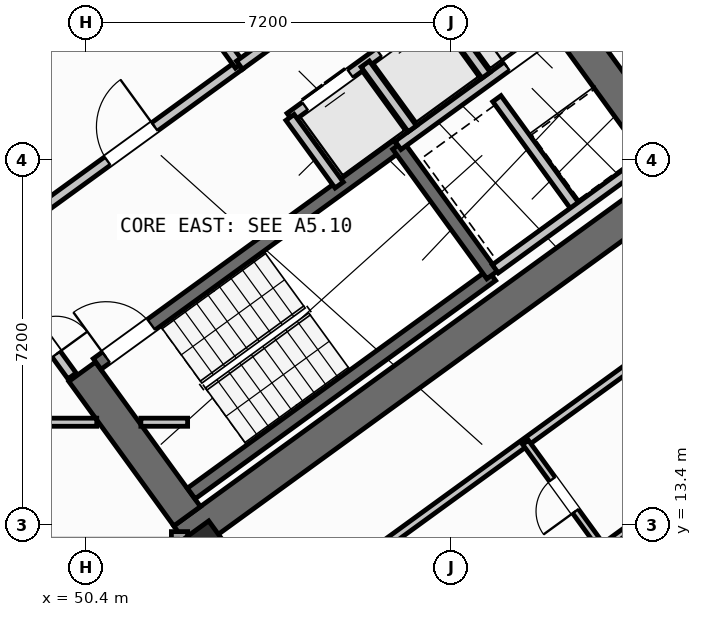
"""IFC4 building model, lengths in metres.
Left out: names, types, materials, properties, quantities, classifications, styles, units other than length and angle.
Written with IfcOpenShell. Run it as: python <this file> out.ifc"""

import sys

from ifc_helpers import new_model, si_unit, direction, frame, frame_2d, origin, origin_2d, place, context, subcontext, project, spatial, rectangle, hollow_rectangle, extrude, source, transform, mapped, element, fill, save


model = new_model("IFC4")
c1 = context("Model", 3, precision=1e-05, world=origin(), true_north=direction((0.0, 1.0)))
c2 = subcontext(c1, "Body", "Model", "MODEL_VIEW")
j1 = project(units=[si_unit("LENGTHUNIT", "METRE"), si_unit("PLANEANGLEUNIT", "RADIAN")], contexts=[c1])
p1 = place(None, origin())
s1 = spatial("IfcSite", under=j1, at=p1, CompositionType="ELEMENT")
p2 = place(p1, origin())
s2 = spatial("IfcBuilding", under=s1, at=p2, CompositionType="ELEMENT")
p3 = place(p2, frame((0.0, 0.0, 49.2)))
s3 = spatial("IfcBuildingStorey", under=s2, at=p3, CompositionType="ELEMENT", Elevation=49.2)
p4 = place(p3, frame((52.318, 13.11, 0.0), z_axis=(0.0, 0.0, 1.0), x_axis=(0.809019445368, 0.587781878776, 0.0)))
e1 = element("IfcWall", 1, at=p4, inside=s3, PredefinedType="SHEAR", context=c2, shape_type="SweptSolid", body=[
    extrude(rectangle(XDim=12.44, YDim=0.65, at=frame_2d((6.22, 0.0))), origin(), (0.0, 0.0, 1.0), 3.35),
])
p5 = place(p3, frame((52.39, 13.564, 0.0), z_axis=(0.0, 0.0, 1.0), x_axis=(-0.58779688989, 0.809008539037, 0.0)))
e2 = element("IfcWall", 2, at=p5, inside=s3, PredefinedType="SHEAR", context=c2, shape_type="SweptSolid", body=[
    extrude(rectangle(XDim=3.525, YDim=0.65, at=frame_2d((1.763, 0.0))), origin(), (0.0, 0.0, 1.0), 3.35),
])
p6 = place(p3, frame((61.929, 20.494, 0.0), z_axis=(0.0, 0.0, 1.0), x_axis=(-0.58782982593, 0.808984607855, 0.0)))
e3 = element("IfcWall", 3, at=p6, inside=s3, PredefinedType="SHEAR", context=c2, shape_type="SweptSolid", body=[
    extrude(rectangle(XDim=3.525, YDim=0.65, at=frame_2d((1.762, 0.0))), origin(), (0.0, 0.0, 1.0), 3.35),
])
m1 = source(origin(), c2, "Body", "SweptSolid", [
    extrude(hollow_rectangle(XDim=1.0, YDim=1.0, WallThickness=0.04, at=origin_2d()), origin(), (0.0, 0.0, 1.0), 3.6),
])
p7 = place(p3, frame((52.705, 12.773, 0.0), z_axis=(0.0, 0.0, 1.0), x_axis=(0.809016994375, 0.587785252292, 0.0)))
e4 = element("IfcColumn", 4, at=p7, inside=s3, PredefinedType="COLUMN", context=c2, shape_type="MappedRepresentation", body=[
    mapped(m1, transform((0.0, 0.0, 0.0), scale=1.0)),
])
p8 = place(p3, frame((58.455, 35.484, 0.0), z_axis=(0.0, 0.0, 1.0), x_axis=(0.587783625747, -0.809018176127, 0.0)))
e5 = element("IfcWall", 5, at=p8, inside=s3, PredefinedType="STANDARD", context=c2, shape_type="SweptSolid", body=[
    extrude(rectangle(XDim=21.587, YDim=0.32, at=frame_2d((10.794, 0.0))), origin(), (0.0, 0.0, 1.0), 2.725),
])
p9 = place(p8, frame((1.5, 0.0, 0.8)))
e6 = element("IfcOpeningElement", 6, at=p9, cuts=e5, PredefinedType="OPENING", context=c2, shape_type="SweptSolid", body=[
    extrude(rectangle(XDim=2.1, YDim=1.55, at=frame_2d((1.05, 0.775))), frame((0.0, 0.17, 0.0), z_axis=(0.0, -1.0, 0.0), x_axis=(1.0, 0.0, 0.0)), (0.0, 0.0, 1.0), 0.34),
])
p10 = place(p8, frame((5.105, 0.0, 0.85)))
e7 = element("IfcOpeningElement", 7, at=p10, cuts=e5, PredefinedType="OPENING", context=c2, shape_type="SweptSolid", body=[
    extrude(rectangle(XDim=1.5, YDim=1.5, at=frame_2d((0.75, 0.75))), frame((0.0, 0.17, 0.0), z_axis=(0.0, -1.0, 0.0), x_axis=(1.0, 0.0, 0.0)), (0.0, 0.0, 1.0), 0.34),
])
p11 = place(p8, frame((8.954, 0.0, 0.85)))
e8 = element("IfcOpeningElement", 8, at=p11, cuts=e5, PredefinedType="OPENING", context=c2, shape_type="SweptSolid", body=[
    extrude(rectangle(XDim=1.5, YDim=1.5, at=frame_2d((0.75, 0.75))), frame((0.0, 0.17, 0.0), z_axis=(0.0, -1.0, 0.0), x_axis=(1.0, 0.0, 0.0)), (0.0, 0.0, 1.0), 0.34),
])
p12 = place(p8, frame((17.581, 0.0, 0.95)))
e9 = element("IfcOpeningElement", 9, at=p12, cuts=e5, PredefinedType="OPENING", context=c2, shape_type="SweptSolid", body=[
    extrude(rectangle(XDim=1.2, YDim=1.4, at=frame_2d((0.6, 0.7))), frame((0.0, 0.17, 0.0), z_axis=(0.0, -1.0, 0.0), x_axis=(1.0, 0.0, 0.0)), (0.0, 0.0, 1.0), 0.34),
])
p13 = place(p3, frame((71.098, 17.731, 0.0), z_axis=(0.0, 0.0, 1.0), x_axis=(-0.809021120468, -0.587779573171, 0.0)))
e10 = element("IfcWall", 10, at=p13, inside=s3, PredefinedType="STANDARD", context=c2, shape_type="SweptSolid", body=[
    extrude(rectangle(XDim=17.588, YDim=0.32, at=frame_2d((8.794, 0.0))), origin(), (0.0, 0.0, 1.0), 3.35),
])
p14 = place(p13, frame((1.624, 0.0, 0.0)))
e11 = element("IfcOpeningElement", 11, at=p14, cuts=e10, PredefinedType="OPENING", context=c2, shape_type="SweptSolid", body=[
    extrude(rectangle(XDim=1.05, YDim=2.15, at=frame_2d((0.525, 1.075))), frame((0.0, 0.17, 0.0), z_axis=(0.0, -1.0, 0.0), x_axis=(1.0, 0.0, 0.0)), (0.0, 0.0, 1.0), 0.34),
])
p15 = place(p13, frame((4.104, 0.0, 1.0)))
e12 = element("IfcOpeningElement", 12, at=p15, cuts=e10, PredefinedType="OPENING", context=c2, shape_type="SweptSolid", body=[
    extrude(rectangle(XDim=0.9, YDim=1.25, at=frame_2d((0.45, 0.625))), frame((0.0, 0.17, 0.0), z_axis=(0.0, -1.0, 0.0), x_axis=(1.0, 0.0, 0.0)), (0.0, 0.0, 1.0), 0.34),
])
p16 = place(p13, frame((7.879, 0.0, 0.85)))
e13 = element("IfcOpeningElement", 13, at=p16, cuts=e10, PredefinedType="OPENING", context=c2, shape_type="SweptSolid", body=[
    extrude(rectangle(XDim=1.8, YDim=1.5, at=frame_2d((0.9, 0.75))), frame((0.0, 0.17, 0.0), z_axis=(0.0, -1.0, 0.0), x_axis=(1.0, 0.0, 0.0)), (0.0, 0.0, 1.0), 0.34),
])
p17 = place(p13, frame((12.849, 0.0, 0.85)))
e14 = element("IfcOpeningElement", 14, at=p17, cuts=e10, PredefinedType="OPENING", context=c2, shape_type="SweptSolid", body=[
    extrude(rectangle(XDim=1.8, YDim=1.5, at=frame_2d((0.9, 0.75))), frame((0.0, 0.17, 0.0), z_axis=(0.0, -1.0, 0.0), x_axis=(1.0, 0.0, 0.0)), (0.0, 0.0, 1.0), 0.34),
])
p18 = place(p3, frame((52.24, 13.261, 0.0), z_axis=(0.0, 0.0, 1.0), x_axis=(0.0, -1.0, 0.0)))
e15 = element("IfcWall", 15, at=p18, inside=s3, PredefinedType="STANDARD", context=c2, shape_type="SweptSolid", body=[
    extrude(rectangle(XDim=9.795, YDim=0.32, at=frame_2d((4.897, 0.0))), origin(), (0.0, 0.0, 1.0), 3.35),
])
p19 = place(p18, frame((2.349, 0.0, 0.8)))
e16 = element("IfcOpeningElement", 16, at=p19, cuts=e15, PredefinedType="OPENING", context=c2, shape_type="SweptSolid", body=[
    extrude(rectangle(XDim=2.1, YDim=1.55, at=frame_2d((1.05, 0.775))), frame((0.0, 0.17, 0.0), z_axis=(0.0, -1.0, 0.0), x_axis=(1.0, 0.0, 0.0)), (0.0, 0.0, 1.0), 0.34),
])
p20 = place(p18, frame((7.03, 0.0, 0.85)))
e17 = element("IfcOpeningElement", 17, at=p20, cuts=e15, PredefinedType="OPENING", context=c2, shape_type="SweptSolid", body=[
    extrude(rectangle(XDim=1.8, YDim=1.5, at=frame_2d((0.9, 0.75))), frame((0.0, 0.17, 0.0), z_axis=(0.0, -1.0, 0.0), x_axis=(1.0, 0.0, 0.0)), (0.0, 0.0, 1.0), 0.34),
])
p21 = place(p3, frame((52.472, 14.013, 0.0), z_axis=(0.0, 0.0, 1.0), x_axis=(0.809028366311, 0.587769599847, 0.0)))
e18 = element("IfcWall", 18, at=p21, inside=s3, PredefinedType="SHEAR", context=c2, shape_type="SweptSolid", body=[
    extrude(rectangle(XDim=7.33, YDim=0.26, at=frame_2d((3.665, 0.0))), origin(), (0.0, 0.0, 1.0), 3.35),
])
p22 = place(p3, frame((50.615, 16.57, 0.0), z_axis=(0.0, 0.0, 1.0), x_axis=(0.809028366311, 0.587769599847, 0.0)))
e19 = element("IfcWall", 19, at=p22, inside=s3, PredefinedType="SHEAR", context=c2, shape_type="SweptSolid", body=[
    extrude(rectangle(XDim=7.33, YDim=0.26, at=frame_2d((3.665, 0.0))), origin(), (0.0, 0.0, 1.0), 3.35),
])
p23 = place(p22, frame((0.22, 0.0, 0.0)))
e20 = element("IfcOpeningElement", 20, at=p23, cuts=e19, PredefinedType="OPENING", context=c2, shape_type="SweptSolid", body=[
    extrude(rectangle(XDim=1.1, YDim=2.1, at=frame_2d((0.55, 1.05))), frame((0.0, 0.14, 0.0), z_axis=(0.0, -1.0, 0.0), x_axis=(1.0, 0.0, 0.0)), (0.0, 0.0, 1.0), 0.28),
])
p24 = place(p3, frame((58.41, 18.327, 0.0), z_axis=(0.0, 0.0, 1.0), x_axis=(-0.58776738483, 0.809029975545, 0.0)))
e21 = element("IfcWall", 21, at=p24, inside=s3, PredefinedType="SHEAR", context=c2, shape_type="SweptSolid", body=[
    extrude(rectangle(XDim=3.16, YDim=0.26, at=frame_2d((1.58, 0.0))), origin(), (0.0, 0.0, 1.0), 3.35),
])
p25 = place(p3, frame((47.106, 21.437, 0.0), z_axis=(0.0, 0.0, 1.0), x_axis=(0.809012514015, 0.58779141893, 0.0)))
e22 = element("IfcWall", 22, at=p25, inside=s3, PredefinedType="STANDARD", context=c2, shape_type="SweptSolid", body=[
    extrude(rectangle(XDim=3.398, YDim=0.2, at=frame_2d((1.699, 0.0))), origin(), (0.0, 0.0, 1.0), 3.34),
])
p26 = place(p25, frame((0.408, 0.0, 0.0)))
e23 = element("IfcOpeningElement", 23, at=p26, cuts=e22, PredefinedType="OPENING", context=c2, shape_type="SweptSolid", body=[
    extrude(rectangle(XDim=1.3, YDim=2.2, at=frame_2d((0.65, 1.1))), frame((0.0, 0.11, 0.0), z_axis=(0.0, -1.0, 0.0), x_axis=(1.0, 0.0, 0.0)), (0.0, 0.0, 1.0), 0.22),
])
p27 = place(p3, frame((48.799, 19.107, 0.0), z_axis=(0.0, 0.0, 1.0), x_axis=(0.809012959416, 0.587790805897, 0.0)))
e24 = element("IfcWall", 24, at=p27, inside=s3, PredefinedType="STANDARD", context=c2, shape_type="SweptSolid", body=[
    extrude(rectangle(XDim=5.718, YDim=0.2, at=frame_2d((2.859, 0.0))), origin(), (0.0, 0.0, 1.0), 3.34),
])
p28 = place(p27, frame((2.498, 0.0, 0.0)))
e25 = element("IfcOpeningElement", 25, at=p28, cuts=e24, PredefinedType="OPENING", context=c2, shape_type="SweptSolid", body=[
    extrude(rectangle(XDim=1.15, YDim=2.1, at=frame_2d((0.575, 1.05))), frame((0.0, 0.11, 0.0), z_axis=(0.0, -1.0, 0.0), x_axis=(1.0, 0.0, 0.0)), (0.0, 0.0, 1.0), 0.22),
])
p29 = place(p3, frame((56.553, 20.884, 0.0), z_axis=(0.0, 0.0, 1.0), x_axis=(0.809035789462, 0.587759382205, 0.0)))
e26 = element("IfcWall", 26, at=p29, inside=s3, PredefinedType="STANDARD", context=c2, shape_type="SweptSolid", body=[
    extrude(rectangle(XDim=3.768, YDim=0.2, at=frame_2d((1.884, 0.0))), origin(), (0.0, 0.0, 1.0), 3.34),
])
p30 = place(p29, frame((2.65, 0.0, 0.0)))
e27 = element("IfcOpeningElement", 27, at=p30, cuts=e26, PredefinedType="OPENING", context=c2, shape_type="SweptSolid", body=[
    extrude(rectangle(XDim=0.86, YDim=2.05, at=frame_2d((0.43, 1.025))), frame((0.0, 0.11, 0.0), z_axis=(0.0, -1.0, 0.0), x_axis=(1.0, 0.0, 0.0)), (0.0, 0.0, 1.0), 0.22),
])
p31 = place(p3, frame((54.421, 21.436, 0.0), z_axis=(0.0, 0.0, 1.0), x_axis=(0.809013710463, 0.587789772183, 0.0)))
e28 = element("IfcWall", 28, at=p31, inside=s3, PredefinedType="STANDARD", context=c2, shape_type="SweptSolid", body=[
    extrude(rectangle(XDim=5.36, YDim=0.2, at=frame_2d((2.68, 0.0))), origin(), (0.0, 0.0, 1.0), 3.34),
])
p32 = place(p31, frame((0.37, 0.0, 0.0)))
e29 = element("IfcOpeningElement", 29, at=p32, cuts=e28, PredefinedType="OPENING", context=c2, shape_type="SweptSolid", body=[
    extrude(rectangle(XDim=1.1, YDim=2.15, at=frame_2d((0.55, 1.075))), frame((0.0, 0.11, 0.0), z_axis=(0.0, -1.0, 0.0), x_axis=(1.0, 0.0, 0.0)), (0.0, 0.0, 1.0), 0.22),
])
p33 = place(p31, frame((2.17, 0.0, 0.0)))
e30 = element("IfcOpeningElement", 30, at=p33, cuts=e28, PredefinedType="OPENING", context=c2, shape_type="SweptSolid", body=[
    extrude(rectangle(XDim=1.1, YDim=2.15, at=frame_2d((0.55, 1.075))), frame((0.0, 0.11, 0.0), z_axis=(0.0, -1.0, 0.0), x_axis=(1.0, 0.0, 0.0)), (0.0, 0.0, 1.0), 0.22),
])
p34 = place(p31, frame((3.97, 0.0, 0.0)))
e31 = element("IfcOpeningElement", 31, at=p34, cuts=e28, PredefinedType="OPENING", context=c2, shape_type="SweptSolid", body=[
    extrude(rectangle(XDim=1.1, YDim=2.15, at=frame_2d((0.55, 1.075))), frame((0.0, 0.11, 0.0), z_axis=(0.0, -1.0, 0.0), x_axis=(1.0, 0.0, 0.0)), (0.0, 0.0, 1.0), 0.22),
])
p35 = place(p3, frame((55.391, 20.102, 0.0), z_axis=(0.0, 0.0, 1.0), x_axis=(-0.58778447739, 0.809017557374, 0.0)))
e32 = element("IfcWall", 32, at=p35, inside=s3, PredefinedType="STANDARD", context=c2, shape_type="SweptSolid", body=[
    extrude(rectangle(XDim=1.65, YDim=0.2, at=frame_2d((0.825, 0.0))), origin(), (0.0, 0.0, 1.0), 3.34),
])
p36 = place(p3, frame((56.834, 21.212, 0.0), z_axis=(0.0, 0.0, 1.0), x_axis=(-0.58776738483, 0.809029975545, 0.0)))
e33 = element("IfcWall", 33, at=p36, inside=s3, PredefinedType="STANDARD", context=c2, shape_type="SweptSolid", body=[
    extrude(rectangle(XDim=1.58, YDim=0.2, at=frame_2d((0.79, 0.0))), origin(), (0.0, 0.0, 1.0), 3.34),
])
p37 = place(p3, frame((58.29, 22.27, 0.0), z_axis=(0.0, 0.0, 1.0), x_axis=(-0.587840865826, 0.808976585857, 0.0)))
e34 = element("IfcWall", 34, at=p37, inside=s3, PredefinedType="STANDARD", context=c2, shape_type="SweptSolid", body=[
    extrude(rectangle(XDim=1.58, YDim=0.2, at=frame_2d((0.79, 0.0))), origin(), (0.0, 0.0, 1.0), 3.34),
])
p38 = place(p3, frame((60.067, 19.655, 0.0), z_axis=(0.0, 0.0, 1.0), x_axis=(-0.587800520745, 0.809005900975, 0.0)))
e35 = element("IfcWall", 35, at=p38, inside=s3, PredefinedType="STANDARD", context=c2, shape_type="SweptSolid", body=[
    extrude(rectangle(XDim=2.66, YDim=0.2, at=frame_2d((1.33, 0.0))), origin(), (0.0, 0.0, 1.0), 3.34),
])
p39 = place(p3, frame((58.472, 18.447, 0.0), z_axis=(0.0, 0.0, 1.0), x_axis=(0.809022487728, 0.587777691266, 0.0)))
e36 = element("IfcWall", 36, at=p39, inside=s3, PredefinedType="STANDARD", context=c2, shape_type="SweptSolid", body=[
    extrude(rectangle(XDim=3.648, YDim=0.2, at=frame_2d((1.824, 0.0))), origin(), (0.0, 0.0, 1.0), 3.34),
])
p40 = place(p3, frame((53.425, 22.468, 0.0), z_axis=(0.0, 0.0, 1.0), x_axis=(-0.5877230039, 0.809062216821, 0.0)))
e37 = element("IfcWall", 37, at=p40, inside=s3, PredefinedType="STANDARD", context=c2, shape_type="SweptSolid", body=[
    extrude(rectangle(XDim=2.88, YDim=0.2, at=frame_2d((1.44, 0.0))), origin(), (0.0, 0.0, 1.0), 3.34),
])
p41 = place(p3, frame((53.425, 22.468, 0.0), z_axis=(0.0, 0.0, 1.0), x_axis=(0.80902705128, 0.587771409902, 0.0)))
e38 = element("IfcWall", 38, at=p41, inside=s3, PredefinedType="STANDARD", context=c2, shape_type="SweptSolid", body=[
    extrude(rectangle(XDim=5.368, YDim=0.2, at=frame_2d((2.684, 0.0))), origin(), (0.0, 0.0, 1.0), 3.34),
])
p42 = place(p41, frame((4.28, 0.0, 0.0)))
e39 = element("IfcOpeningElement", 39, at=p42, cuts=e38, PredefinedType="OPENING", context=c2, shape_type="SweptSolid", body=[
    extrude(rectangle(XDim=0.86, YDim=2.05, at=frame_2d((0.43, 1.025))), frame((0.0, 0.11, 0.0), z_axis=(0.0, -1.0, 0.0), x_axis=(1.0, 0.0, 0.0)), (0.0, 0.0, 1.0), 0.22),
])
p43 = place(p41, frame((1.45, 0.0, 0.0)))
e40 = element("IfcOpeningElement", 40, at=p43, cuts=e38, PredefinedType="OPENING", context=c2, shape_type="SweptSolid", body=[
    extrude(rectangle(XDim=0.86, YDim=2.05, at=frame_2d((0.43, 1.025))), frame((0.0, 0.11, 0.0), z_axis=(0.0, -1.0, 0.0), x_axis=(1.0, 0.0, 0.0)), (0.0, 0.0, 1.0), 0.22),
])
p44 = place(p3, frame((35.296, 15.42, 0.0), z_axis=(0.0, 0.0, 1.0), x_axis=(1.0, 0.0, 0.0)))
e41 = element("IfcWall", 41, at=p44, inside=s3, PredefinedType="PARTITIONING", context=c2, shape_type="SweptSolid", body=[
    extrude(rectangle(XDim=15.311, YDim=0.16, at=frame_2d((7.655, 0.0))), origin(), (0.0, 0.0, 1.0), 3.34),
])
p45 = place(p44, frame((0.615, 0.0, 0.0)))
e42 = element("IfcOpeningElement", 42, at=p45, cuts=e41, PredefinedType="OPENING", context=c2, shape_type="SweptSolid", body=[
    extrude(rectangle(XDim=1.0, YDim=2.1, at=frame_2d((0.5, 1.05))), frame((0.0, 0.09, 0.0), z_axis=(0.0, -1.0, 0.0), x_axis=(1.0, 0.0, 0.0)), (0.0, 0.0, 1.0), 0.18),
])
p46 = place(p44, frame((9.035, 0.0, 0.0)))
e43 = element("IfcOpeningElement", 43, at=p46, cuts=e41, PredefinedType="OPENING", context=c2, shape_type="SweptSolid", body=[
    extrude(rectangle(XDim=1.0, YDim=2.1, at=frame_2d((0.5, 1.05))), frame((0.0, 0.09, 0.0), z_axis=(0.0, -1.0, 0.0), x_axis=(1.0, 0.0, 0.0)), (0.0, 0.0, 1.0), 0.18),
])
p47 = place(p3, frame((51.477, 15.42, 0.0), z_axis=(0.0, 0.0, 1.0), x_axis=(1.0, 0.0, 0.0)))
e44 = element("IfcWall", 44, at=p47, inside=s3, PredefinedType="PARTITIONING", context=c2, shape_type="SweptSolid", body=[
    extrude(rectangle(XDim=0.923, YDim=0.16, at=frame_2d((0.461, 0.0))), origin(), (0.0, 0.0, 1.0), 3.34),
])
p48 = place(p3, frame((50.119, 16.333, 0.0), z_axis=(0.0, 0.0, 1.0), x_axis=(-0.587749856981, 0.809042709391, 0.0)))
e45 = element("IfcWall", 45, at=p48, inside=s3, PredefinedType="STANDARD", context=c2, shape_type="SweptSolid", body=[
    extrude(rectangle(XDim=2.96, YDim=0.2, at=frame_2d((1.48, 0.0))), origin(), (0.0, 0.0, 1.0), 3.34),
])
p49 = place(p48, frame((0.53, 0.0, 0.0)))
e46 = element("IfcOpeningElement", 46, at=p49, cuts=e45, PredefinedType="OPENING", context=c2, shape_type="SweptSolid", body=[
    extrude(rectangle(XDim=1.5, YDim=2.15, at=frame_2d((0.75, 1.075))), frame((0.0, 0.11, 0.0), z_axis=(0.0, -1.0, 0.0), x_axis=(1.0, 0.0, 0.0)), (0.0, 0.0, 1.0), 0.22),
])
p50 = place(p3, frame((53.705, 11.126, 0.0), z_axis=(0.0, 0.0, 1.0), x_axis=(0.809014504436, 0.587788679384, 0.0)))
e47 = element("IfcWall", 47, at=p50, inside=s3, PredefinedType="PARTITIONING", context=c2, shape_type="SweptSolid", body=[
    extrude(rectangle(XDim=14.67, YDim=0.16, at=frame_2d((7.335, 0.0))), origin(), (0.0, 0.0, 1.0), 3.34),
])
p51 = place(p50, frame((10.2, 0.0, 0.0)))
e48 = element("IfcOpeningElement", 48, at=p51, cuts=e47, PredefinedType="OPENING", context=c2, shape_type="SweptSolid", body=[
    extrude(rectangle(XDim=1.0, YDim=2.1, at=frame_2d((0.5, 1.05))), frame((0.0, 0.09, 0.0), z_axis=(0.0, -1.0, 0.0), x_axis=(1.0, 0.0, 0.0)), (0.0, 0.0, 1.0), 0.18),
])
p52 = place(p3, frame((56.249, 9.785, 0.0), z_axis=(0.0, 0.0, 1.0), x_axis=(0.809011747655, 0.587792473715, 0.0)))
e49 = element("IfcWall", 49, at=p52, inside=s3, PredefinedType="PLUMBINGWALL", context=c2, shape_type="SweptSolid", body=[
    extrude(rectangle(XDim=13.4, YDim=0.14, at=frame_2d((6.7, 0.0))), origin(), (0.0, 0.0, 1.0), 3.34),
])
p53 = place(p52, frame((8.94, 0.0, 0.0)))
e50 = element("IfcOpeningElement", 50, at=p53, cuts=e49, PredefinedType="OPENING", context=c2, shape_type="SweptSolid", body=[
    extrude(rectangle(XDim=0.92, YDim=2.08, at=frame_2d((0.46, 1.04))), frame((0.0, 0.08, 0.0), z_axis=(0.0, -1.0, 0.0), x_axis=(1.0, 0.0, 0.0)), (0.0, 0.0, 1.0), 0.16),
])
p54 = place(p3, frame((60.585, 12.936, 0.0), z_axis=(0.0, 0.0, 1.0), x_axis=(-0.587772116736, 0.809026537752, 0.0)))
e51 = element("IfcWall", 51, at=p54, inside=s3, PredefinedType="PLUMBINGWALL", context=c2, shape_type="SweptSolid", body=[
    extrude(rectangle(XDim=2.58, YDim=0.14, at=frame_2d((1.29, 0.0))), origin(), (0.0, 0.0, 1.0), 3.34),
])
p55 = place(p54, frame((0.9, 0.0, 0.0)))
e52 = element("IfcOpeningElement", 52, at=p55, cuts=e51, PredefinedType="OPENING", context=c2, shape_type="SweptSolid", body=[
    extrude(rectangle(XDim=0.78, YDim=2.05, at=frame_2d((0.39, 1.025))), frame((0.0, 0.08, 0.0), z_axis=(0.0, -1.0, 0.0), x_axis=(1.0, 0.0, 0.0)), (0.0, 0.0, 1.0), 0.16),
])
m2 = source(origin(), c2, "Body", "SweptSolid", [
    extrude(rectangle(XDim=1.1, YDim=2.1, at=frame_2d((0.55, 1.05))), frame((0.0, 0.025, 0.0), z_axis=(0.0, -1.0, 0.0), x_axis=(1.0, 0.0, 0.0)), (0.0, 0.0, 1.0), 0.05),
])
p56 = place(p23, origin())
e53 = element("IfcDoor", 53, at=p56, inside=s3, OperationType="SINGLE_SWING_LEFT", PredefinedType="DOOR", context=c2, shape_type="MappedRepresentation", body=[
    mapped(m2, transform((0.0, 0.0, 0.0), scale=1.0)),
])
fill(e20, e53)
m3 = source(origin(), c2, "Body", "SweptSolid", [
    extrude(rectangle(XDim=1.15, YDim=2.1, at=frame_2d((0.575, 1.05))), frame((0.0, 0.025, 0.0), z_axis=(0.0, -1.0, 0.0), x_axis=(1.0, 0.0, 0.0)), (0.0, 0.0, 1.0), 0.05),
])
p57 = place(p28, origin())
e54 = element("IfcDoor", 54, at=p57, inside=s3, OperationType="SINGLE_SWING_RIGHT", PredefinedType="DOOR", context=c2, shape_type="MappedRepresentation", body=[
    mapped(m3, transform((0.0, 0.0, 0.0), scale=1.0)),
])
fill(e25, e54)
m4 = source(origin(), c2, "Body", "SweptSolid", [
    extrude(rectangle(XDim=1.1, YDim=2.15, at=frame_2d((0.55, 1.075))), frame((0.0, 0.025, 0.0), z_axis=(0.0, -1.0, 0.0), x_axis=(1.0, 0.0, 0.0)), (0.0, 0.0, 1.0), 0.05),
])
p58 = place(p32, origin())
e55 = element("IfcDoor", 55, at=p58, inside=s3, OperationType="DOUBLE_DOOR_SLIDING", PredefinedType="DOOR", context=c2, shape_type="MappedRepresentation", body=[
    mapped(m4, transform((0.0, 0.0, 0.0), scale=1.0)),
])
fill(e29, e55)
p59 = place(p33, origin())
e56 = element("IfcDoor", 56, at=p59, inside=s3, OperationType="DOUBLE_DOOR_SLIDING", PredefinedType="DOOR", context=c2, shape_type="MappedRepresentation", body=[
    mapped(m4, transform((0.0, 0.0, 0.0), scale=1.0)),
])
fill(e30, e56)
m5 = source(origin(), c2, "Body", "SweptSolid", [
    extrude(rectangle(XDim=0.86, YDim=2.05, at=frame_2d((0.43, 1.025))), frame((0.0, 0.025, 0.0), z_axis=(0.0, -1.0, 0.0), x_axis=(1.0, 0.0, 0.0)), (0.0, 0.0, 1.0), 0.05),
])
p60 = place(p30, origin())
e57 = element("IfcDoor", 57, at=p60, inside=s3, OperationType="SINGLE_SWING_LEFT", PredefinedType="DOOR", context=c2, shape_type="MappedRepresentation", body=[
    mapped(m5, transform((0.0, 0.0, 0.0), scale=1.0)),
])
fill(e27, e57)
m6 = source(origin(), c2, "Body", "SweptSolid", [
    extrude(rectangle(XDim=1.5, YDim=2.15, at=frame_2d((0.75, 1.075))), frame((0.0, 0.025, 0.0), z_axis=(0.0, -1.0, 0.0), x_axis=(1.0, 0.0, 0.0)), (0.0, 0.0, 1.0), 0.05),
])
p61 = place(p49, frame((1.5, 0.0, 0.0), z_axis=(0.0, 0.0, 1.0), x_axis=(-1.0, 0.0, 0.0)))
e58 = element("IfcDoor", 58, at=p61, inside=s3, OperationType="DOUBLE_DOOR_SINGLE_SWING", PredefinedType="DOOR", context=c2, shape_type="MappedRepresentation", body=[
    mapped(m6, transform((0.0, 0.0, 0.0), scale=1.0)),
])
fill(e46, e58)
m7 = source(origin(), c2, "Body", "SweptSolid", [
    extrude(rectangle(XDim=0.78, YDim=2.05, at=frame_2d((0.39, 1.025))), frame((0.0, 0.025, 0.0), z_axis=(0.0, -1.0, 0.0), x_axis=(1.0, 0.0, 0.0)), (0.0, 0.0, 1.0), 0.05),
])
p62 = place(p55, origin())
e59 = element("IfcDoor", 59, at=p62, inside=s3, OperationType="SINGLE_SWING_LEFT", PredefinedType="DOOR", context=c2, shape_type="MappedRepresentation", body=[
    mapped(m7, transform((0.0, 0.0, 0.0), scale=1.0)),
])
fill(e52, e59)
save(model, sys.argv[1])
